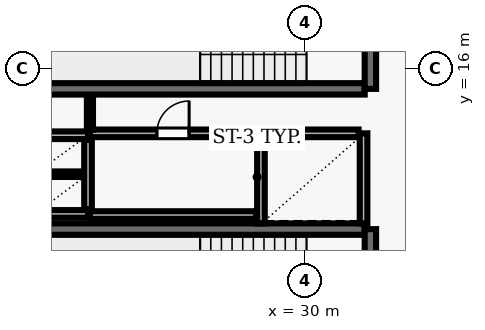
"""IFC4 building model, lengths in metres.
Left out: names, types, materials, properties, quantities, classifications, styles, units other than length and angle.
Written with IfcOpenShell. Run it as: python <this file> out.ifc"""

import sys

from ifc_helpers import new_model, si_unit, direction, frame, frame_2d, origin, place, context, subcontext, project, spatial, rectangle, extrude, element, fill, save


model = new_model("IFC4")
c1 = context("Model", 3, precision=1e-05, world=origin(), true_north=direction((0.0, 1.0)))
c2 = subcontext(c1, "Body", "Model", "MODEL_VIEW")
j1 = project(units=[si_unit("LENGTHUNIT", "METRE"), si_unit("PLANEANGLEUNIT", "RADIAN")], contexts=[c1])
p1 = place(None, origin())
s1 = spatial("IfcSite", under=j1, at=p1, CompositionType="ELEMENT")
p2 = place(p1, origin())
s2 = spatial("IfcBuilding", under=s1, at=p2, CompositionType="ELEMENT")
p3 = place(p2, frame((0.0, 0.0, 62.2)))
s3 = spatial("IfcBuildingStorey", under=s2, at=p3, CompositionType="ELEMENT", Elevation=62.2)
p4 = place(p3, frame((23.22, 15.47, 0.0), z_axis=(0.0, 0.0, 1.0), x_axis=(1.0, 0.0, 0.0)))
e1 = element("IfcWall", 1, at=p4, inside=s3, PredefinedType="SHEAR", context=c2, shape_type="SweptSolid", body=[
    extrude(rectangle(XDim=8.36, YDim=0.3, at=frame_2d((4.18, 0.0))), origin(), (0.0, 0.0, 1.0), 3.69),
])
p5 = place(p3, frame((31.73, 15.47, 0.0), z_axis=(0.0, 0.0, 1.0), x_axis=(0.0, 1.0, 0.0)))
e2 = element("IfcWall", 2, at=p5, inside=s3, PredefinedType="SHEAR", context=c2, shape_type="SweptSolid", body=[
    extrude(rectangle(XDim=3.51, YDim=0.3, at=frame_2d((1.755, 0.0))), origin(), (0.0, 0.0, 1.0), 3.69),
])
p6 = place(p5, frame((1.18, 0.0, 0.0)))
e3 = element("IfcOpeningElement", 3, at=p6, cuts=e2, PredefinedType="OPENING", context=c2, shape_type="SweptSolid", body=[
    extrude(rectangle(XDim=1.15, YDim=2.15, at=frame_2d((0.575, 1.075))), frame((0.0, 0.16, 0.0), z_axis=(0.0, -1.0, 0.0), x_axis=(1.0, 0.0, 0.0)), (0.0, 0.0, 1.0), 0.32),
])
p7 = place(p3, frame((31.58, 11.78, 0.0), z_axis=(0.0, 0.0, 1.0), x_axis=(-1.0, 0.0, 0.0)))
e4 = element("IfcWall", 4, at=p7, inside=s3, PredefinedType="SHEAR", context=c2, shape_type="SweptSolid", body=[
    extrude(rectangle(XDim=8.36, YDim=0.3, at=frame_2d((4.18, 0.0))), origin(), (0.0, 0.0, 1.0), 3.69),
])
p8 = place(p3, frame((31.73, 8.27, 0.0), z_axis=(0.0, 0.0, 1.0), x_axis=(0.0, 1.0, 0.0)))
e5 = element("IfcWall", 5, at=p8, inside=s3, PredefinedType="SHEAR", context=c2, shape_type="SweptSolid", body=[
    extrude(rectangle(XDim=3.51, YDim=0.3, at=frame_2d((1.755, 0.0))), origin(), (0.0, 0.0, 1.0), 3.69),
])
p9 = place(p8, frame((1.18, 0.0, 0.0)))
e6 = element("IfcOpeningElement", 6, at=p9, cuts=e5, PredefinedType="OPENING", context=c2, shape_type="SweptSolid", body=[
    extrude(rectangle(XDim=1.15, YDim=2.15, at=frame_2d((0.575, 1.075))), frame((0.0, 0.16, 0.0), z_axis=(0.0, -1.0, 0.0), x_axis=(1.0, 0.0, 0.0)), (0.0, 0.0, 1.0), 0.32),
])
for number, where, z_axis, x_axis in (
    (7, (28.85, 14.3, 0.0), (0.0, 0.0, 1.0), (0.0, -1.0, 0.0)),
    (8, (31.55, 11.93, 0.0), (0.0, 0.0, 1.0), (0.0, 1.0, 0.0)),
):
    element("IfcWall", number, at=place(p3, frame(where, z_axis=z_axis, x_axis=x_axis)), inside=s3, PredefinedType="SOLIDWALL", context=c2, shape_type="SweptSolid", body=[
        extrude(rectangle(XDim=2.37, YDim=0.2, at=frame_2d((1.185, 0.0))), origin(), (0.0, 0.0, 1.0), 3.69),
    ])
p10 = place(p3, frame((31.42, 14.3, 0.0), z_axis=(0.0, 0.0, 1.0), x_axis=(-1.0, 0.0, 0.0)))
e9 = element("IfcWall", 9, at=p10, inside=s3, PredefinedType="SOLIDWALL", context=c2, shape_type="SweptSolid", body=[
    extrude(rectangle(XDim=2.44, YDim=0.2, at=frame_2d((1.22, 0.0))), origin(), (0.0, 0.0, 1.0), 3.69),
])
for number, where, z_axis, x_axis in (
    (10, (22.9, 14.25, 0.0), (0.0, 0.0, 1.0), (1.0, 0.0, 0.0)),
    (11, (22.9, 12.18, 0.0), (0.0, 0.0, 1.0), (1.0, 0.0, 0.0)),
):
    element("IfcWall", number, at=place(p3, frame(where, z_axis=z_axis, x_axis=x_axis)), inside=s3, PredefinedType="SOLIDWALL", context=c2, shape_type="SweptSolid", body=[
        extrude(rectangle(XDim=1.4, YDim=0.2, at=frame_2d((0.7, 0.0))), origin(), (0.0, 0.0, 1.0), 3.69),
    ])
p11 = place(p3, frame((24.3, 12.3, 0.0), z_axis=(0.0, 0.0, 1.0), x_axis=(0.0, 1.0, 0.0)))
e12 = element("IfcWall", 12, at=p11, inside=s3, PredefinedType="SOLIDWALL", context=c2, shape_type="SweptSolid", body=[
    extrude(rectangle(XDim=1.83, YDim=0.2, at=frame_2d((0.915, 0.0))), origin(), (0.0, 0.0, 1.0), 3.69),
])
p12 = place(p3, frame((23.01, 13.225, 0.0), z_axis=(0.0, 0.0, 1.0), x_axis=(1.0, 0.0, 0.0)))
e13 = element("IfcWall", 13, at=p12, inside=s3, PredefinedType="PARTITIONING", context=c2, shape_type="SweptSolid", body=[
    extrude(rectangle(XDim=1.18, YDim=0.145, at=frame_2d((0.59, 0.0))), origin(), (0.0, 0.0, 1.0), 3.69),
])
p13 = place(p3, frame((24.35, 12.15, 0.0), z_axis=(0.0, 0.0, 1.0), x_axis=(1.0, 0.0, 0.0)))
e14 = element("IfcWall", 14, at=p13, inside=s3, PredefinedType="SOLIDWALL", context=c2, shape_type="SweptSolid", body=[
    extrude(rectangle(XDim=4.37, YDim=0.2, at=frame_2d((2.185, 0.0))), origin(), (0.0, 0.0, 1.0), 3.69),
])
p14 = place(p3, frame((24.35, 14.3, 0.0), z_axis=(0.0, 0.0, 1.0), x_axis=(1.0, 0.0, 0.0)))
e15 = element("IfcWall", 15, at=p14, inside=s3, PredefinedType="SOLIDWALL", context=c2, shape_type="SweptSolid", body=[
    extrude(rectangle(XDim=4.37, YDim=0.2, at=frame_2d((2.185, 0.0))), origin(), (0.0, 0.0, 1.0), 3.69),
])
p15 = place(p14, frame((1.76, 0.0, 0.0)))
e16 = element("IfcOpeningElement", 16, at=p15, cuts=e15, PredefinedType="OPENING", context=c2, shape_type="SweptSolid", body=[
    extrude(rectangle(XDim=0.85, YDim=2.1, at=frame_2d((0.425, 1.05))), frame((0.0, 0.11, 0.0), z_axis=(0.0, -1.0, 0.0), x_axis=(1.0, 0.0, 0.0)), (0.0, 0.0, 1.0), 0.22),
])
p16 = place(p3, frame((24.35, 15.29, 0.0), z_axis=(0.0, 0.0, 1.0), x_axis=(0.0, -1.0, 0.0)))
e17 = element("IfcWall", 17, at=p16, inside=s3, PredefinedType="PARTITIONING", context=c2, shape_type="SweptSolid", body=[
    extrude(rectangle(XDim=0.895, YDim=0.16, at=frame_2d((0.448, 0.0))), origin(), (0.0, 0.0, 1.0), 3.69),
])
p17 = place(p15, origin())
e18 = element("IfcDoor", 18, at=p17, inside=s3, OperationType="SINGLE_SWING_RIGHT", PredefinedType="DOOR", context=c2, shape_type="SweptSolid", body=[
    extrude(rectangle(XDim=0.85, YDim=2.1, at=frame_2d((0.425, 1.05))), frame((0.0, 0.025, 0.0), z_axis=(0.0, -1.0, 0.0), x_axis=(1.0, 0.0, 0.0)), (0.0, 0.0, 1.0), 0.05),
])
fill(e16, e18)
save(model, sys.argv[1])
